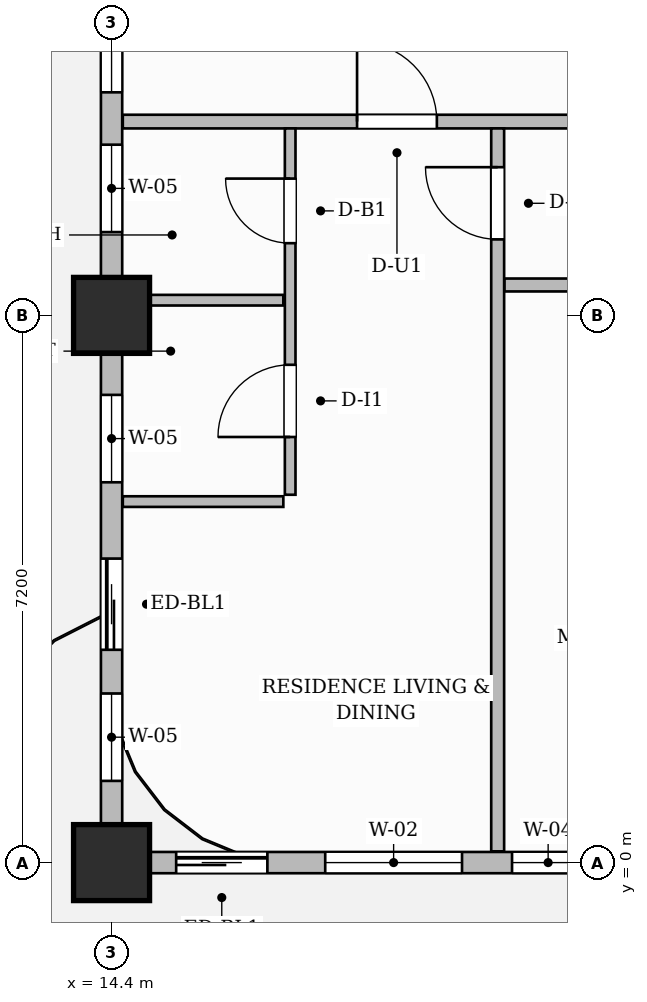
"""IFC4 building model, lengths in metres.
Left out: names, types, materials, properties, quantities, classifications, styles, units other than length and angle.
Written with IfcOpenShell. Run it as: python <this file> out.ifc"""

import sys

from ifc_helpers import new_model, si_unit, direction, frame, frame_2d, origin, origin_2d, place, context, subcontext, project, spatial, rectangle, extrude, source, transform, mapped, element, fill, save


model = new_model("IFC4")
c1 = context("Model", 3, precision=1e-05, world=origin(), true_north=direction((0.0, 1.0)))
c2 = subcontext(c1, "Body", "Model", "MODEL_VIEW")
j1 = project(units=[si_unit("LENGTHUNIT", "METRE"), si_unit("PLANEANGLEUNIT", "RADIAN")], contexts=[c1])
p1 = place(None, origin())
s1 = spatial("IfcSite", under=j1, at=p1, CompositionType="ELEMENT")
p2 = place(p1, origin())
s2 = spatial("IfcBuilding", under=s1, at=p2, CompositionType="ELEMENT")
p3 = place(p2, frame((0.0, 0.0, 173.4)))
s3 = spatial("IfcBuildingStorey", under=s2, at=p3, CompositionType="ELEMENT", Elevation=173.4)
m1 = source(origin(), c2, "Body", "SweptSolid", [
    extrude(rectangle(XDim=1.0, YDim=1.0, at=origin_2d()), origin(), (0.0, 0.0, 1.0), 3.85),
])
for number, where, z_axis, x_axis in (
    (1, (14.4, 0.0, 0.0), (0.0, 0.0, 1.0), (1.0, 0.0, 0.0)),
    (2, (14.4, 7.2, 0.0), (0.0, 0.0, 1.0), (1.0, 0.0, 0.0)),
):
    element("IfcColumn", number, at=place(p3, frame(where, z_axis=z_axis, x_axis=x_axis)), inside=s3, PredefinedType="COLUMN", context=c2, shape_type="MappedRepresentation", body=[
        mapped(m1, transform((0.0, 0.0, 0.0), scale=1.0)),
    ])
p4 = place(p3, frame((14.548, 9.75, 0.0), z_axis=(0.0, 0.0, 1.0), x_axis=(1.0, 0.0, 0.0)))
e3 = element("IfcWall", 3, at=p4, inside=s3, PredefinedType="PARTITIONING", context=c2, shape_type="SweptSolid", body=[
    extrude(rectangle(XDim=15.562, YDim=0.18, at=frame_2d((7.781, 0.0))), origin(), (0.0, 0.0, 1.0), 3.6),
])
p5 = place(p4, frame((3.082, 0.0, 0.0)))
e4 = element("IfcOpeningElement", 4, at=p5, cuts=e3, PredefinedType="OPENING", context=c2, shape_type="SweptSolid", body=[
    extrude(rectangle(XDim=1.05, YDim=2.25, at=frame_2d((0.525, 1.125))), frame((0.0, 0.1, 0.0), z_axis=(0.0, -1.0, 0.0), x_axis=(1.0, 0.0, 0.0)), (0.0, 0.0, 1.0), 0.2),
])
p6 = place(p3, frame((16.75, 4.84, 0.0), z_axis=(0.0, 0.0, 1.0), x_axis=(0.0, 1.0, 0.0)))
e5 = element("IfcWall", 5, at=p6, inside=s3, PredefinedType="PARTITIONING", context=c2, shape_type="SweptSolid", body=[
    extrude(rectangle(XDim=4.82, YDim=0.14, at=frame_2d((2.41, 0.0))), origin(), (0.0, 0.0, 1.0), 3.6),
])
p7 = place(p6, frame((0.76, 0.0, 0.0)))
e6 = element("IfcOpeningElement", 6, at=p7, cuts=e5, PredefinedType="OPENING", context=c2, shape_type="SweptSolid", body=[
    extrude(rectangle(XDim=0.95, YDim=2.15, at=frame_2d((0.475, 1.075))), frame((0.0, 0.08, 0.0), z_axis=(0.0, -1.0, 0.0), x_axis=(1.0, 0.0, 0.0)), (0.0, 0.0, 1.0), 0.16),
])
p8 = place(p6, frame((3.31, 0.0, 0.0)))
e7 = element("IfcOpeningElement", 7, at=p8, cuts=e5, PredefinedType="OPENING", context=c2, shape_type="SweptSolid", body=[
    extrude(rectangle(XDim=0.85, YDim=2.1, at=frame_2d((0.425, 1.05))), frame((0.0, 0.08, 0.0), z_axis=(0.0, -1.0, 0.0), x_axis=(1.0, 0.0, 0.0)), (0.0, 0.0, 1.0), 0.16),
])
p9 = place(p3, frame((14.59, 7.4, 0.0), z_axis=(0.0, 0.0, 1.0), x_axis=(1.0, 0.0, 0.0)))
e8 = element("IfcWall", 8, at=p9, inside=s3, PredefinedType="PARTITIONING", context=c2, shape_type="SweptSolid", body=[
    extrude(rectangle(XDim=2.07, YDim=0.14, at=frame_2d((1.035, 0.0))), origin(), (0.0, 0.0, 1.0), 3.085),
])
p10 = place(p3, frame((14.548, 4.75, 0.0), z_axis=(0.0, 0.0, 1.0), x_axis=(1.0, 0.0, 0.0)))
e9 = element("IfcWall", 9, at=p10, inside=s3, PredefinedType="PARTITIONING", context=c2, shape_type="SweptSolid", body=[
    extrude(rectangle(XDim=2.112, YDim=0.14, at=frame_2d((1.056, 0.0))), origin(), (0.0, 0.0, 1.0), 3.6),
])
p11 = place(p3, frame((19.48, 0.148, 0.0), z_axis=(0.0, 0.0, 1.0), x_axis=(0.0, 1.0, 0.0)))
e10 = element("IfcWall", 10, at=p11, inside=s3, PredefinedType="PARTITIONING", context=c2, shape_type="SweptSolid", body=[
    extrude(rectangle(XDim=9.512, YDim=0.17, at=frame_2d((4.756, 0.0))), origin(), (0.0, 0.0, 1.0), 3.6),
])
p12 = place(p11, frame((8.052, 0.0, 0.0)))
e11 = element("IfcOpeningElement", 11, at=p12, cuts=e10, PredefinedType="OPENING", context=c2, shape_type="SweptSolid", body=[
    extrude(rectangle(XDim=0.95, YDim=2.15, at=frame_2d((0.475, 1.075))), frame((0.0, 0.095, 0.0), z_axis=(0.0, -1.0, 0.0), x_axis=(1.0, 0.0, 0.0)), (0.0, 0.0, 1.0), 0.19),
])
p13 = place(p3, frame((19.57, 7.6, 0.0), z_axis=(0.0, 0.0, 1.0), x_axis=(1.0, 0.0, 0.0)))
e12 = element("IfcWall", 12, at=p13, inside=s3, PredefinedType="PARTITIONING", context=c2, shape_type="SweptSolid", body=[
    extrude(rectangle(XDim=10.54, YDim=0.17, at=frame_2d((5.27, 0.0))), origin(), (0.0, 0.0, 1.0), 3.6),
])
p14 = place(p13, frame((2.784, 0.0, 0.0)))
e13 = element("IfcOpeningElement", 13, at=p14, cuts=e12, PredefinedType="OPENING", context=c2, shape_type="SweptSolid", body=[
    extrude(rectangle(XDim=0.95, YDim=2.15, at=frame_2d((0.475, 1.075))), frame((0.0, 0.095, 0.0), z_axis=(0.0, -1.0, 0.0), x_axis=(1.0, 0.0, 0.0)), (0.0, 0.0, 1.0), 0.19),
])
p15 = place(p13, frame((4.865, 0.0, 0.0)))
e14 = element("IfcOpeningElement", 14, at=p15, cuts=e12, PredefinedType="OPENING", context=c2, shape_type="SweptSolid", body=[
    extrude(rectangle(XDim=0.95, YDim=2.15, at=frame_2d((0.475, 1.075))), frame((0.0, 0.095, 0.0), z_axis=(0.0, -1.0, 0.0), x_axis=(1.0, 0.0, 0.0)), (0.0, 0.0, 1.0), 0.19),
])
p16 = place(p13, frame((7.055, 0.0, 0.0)))
e15 = element("IfcOpeningElement", 15, at=p16, cuts=e12, PredefinedType="OPENING", context=c2, shape_type="SweptSolid", body=[
    extrude(rectangle(XDim=0.95, YDim=2.15, at=frame_2d((0.475, 1.075))), frame((0.0, 0.095, 0.0), z_axis=(0.0, -1.0, 0.0), x_axis=(1.0, 0.0, 0.0)), (0.0, 0.0, 1.0), 0.19),
])
p17 = place(p3, frame((14.4, 0.0, 0.0), z_axis=(0.0, 0.0, 1.0), x_axis=(1.0, 0.0, 0.0)))
e16 = element("IfcWall", 16, at=p17, inside=s3, PredefinedType="SOLIDWALL", context=c2, shape_type="SweptSolid", body=[
    extrude(rectangle(XDim=35.4, YDim=0.28, at=frame_2d((17.7, 0.0))), origin(), (0.0, 0.0, 1.0), 3.085),
])
p18 = place(p17, frame((0.85, 0.0, 0.0)))
e17 = element("IfcOpeningElement", 17, at=p18, cuts=e16, PredefinedType="OPENING", context=c2, shape_type="SweptSolid", body=[
    extrude(rectangle(XDim=1.2, YDim=2.2, at=frame_2d((0.6, 1.1))), frame((0.0, 0.15, 0.0), z_axis=(0.0, -1.0, 0.0), x_axis=(1.0, 0.0, 0.0)), (0.0, 0.0, 1.0), 0.3),
])
p19 = place(p17, frame((2.811, 0.0, 0.8)))
e18 = element("IfcOpeningElement", 18, at=p19, cuts=e16, PredefinedType="OPENING", context=c2, shape_type="SweptSolid", body=[
    extrude(rectangle(XDim=1.8, YDim=1.85, at=frame_2d((0.9, 0.925))), frame((0.0, 0.15, 0.0), z_axis=(0.0, -1.0, 0.0), x_axis=(1.0, 0.0, 0.0)), (0.0, 0.0, 1.0), 0.3),
])
p20 = place(p17, frame((5.269, 0.0, 0.8)))
e19 = element("IfcOpeningElement", 19, at=p20, cuts=e16, PredefinedType="OPENING", context=c2, shape_type="SweptSolid", body=[
    extrude(rectangle(XDim=0.95, YDim=1.75, at=frame_2d((0.475, 0.875))), frame((0.0, 0.15, 0.0), z_axis=(0.0, -1.0, 0.0), x_axis=(1.0, 0.0, 0.0)), (0.0, 0.0, 1.0), 0.3),
])
p21 = place(p17, frame((8.181, 0.0, 0.8)))
e20 = element("IfcOpeningElement", 20, at=p21, cuts=e16, PredefinedType="OPENING", context=c2, shape_type="SweptSolid", body=[
    extrude(rectangle(XDim=0.95, YDim=1.75, at=frame_2d((0.475, 0.875))), frame((0.0, 0.15, 0.0), z_axis=(0.0, -1.0, 0.0), x_axis=(1.0, 0.0, 0.0)), (0.0, 0.0, 1.0), 0.3),
])
p22 = place(p17, frame((9.81, 0.0, 0.8)))
e21 = element("IfcOpeningElement", 21, at=p22, cuts=e16, PredefinedType="OPENING", context=c2, shape_type="SweptSolid", body=[
    extrude(rectangle(XDim=1.4, YDim=1.85, at=frame_2d((0.7, 0.925))), frame((0.0, 0.15, 0.0), z_axis=(0.0, -1.0, 0.0), x_axis=(1.0, 0.0, 0.0)), (0.0, 0.0, 1.0), 0.3),
])
p23 = place(p17, frame((12.079, 0.0, 0.8)))
e22 = element("IfcOpeningElement", 22, at=p23, cuts=e16, PredefinedType="OPENING", context=c2, shape_type="SweptSolid", body=[
    extrude(rectangle(XDim=1.15, YDim=1.8, at=frame_2d((0.575, 0.9))), frame((0.0, 0.15, 0.0), z_axis=(0.0, -1.0, 0.0), x_axis=(1.0, 0.0, 0.0)), (0.0, 0.0, 1.0), 0.3),
])
p24 = place(p17, frame((16.804, 0.0, 0.8)))
e23 = element("IfcOpeningElement", 23, at=p24, cuts=e16, PredefinedType="OPENING", context=c2, shape_type="SweptSolid", body=[
    extrude(rectangle(XDim=1.8, YDim=1.85, at=frame_2d((0.9, 0.925))), frame((0.0, 0.15, 0.0), z_axis=(0.0, -1.0, 0.0), x_axis=(1.0, 0.0, 0.0)), (0.0, 0.0, 1.0), 0.3),
])
p25 = place(p17, frame((21.725, 0.0, 0.8)))
e24 = element("IfcOpeningElement", 24, at=p25, cuts=e16, PredefinedType="OPENING", context=c2, shape_type="SweptSolid", body=[
    extrude(rectangle(XDim=1.8, YDim=1.85, at=frame_2d((0.9, 0.925))), frame((0.0, 0.15, 0.0), z_axis=(0.0, -1.0, 0.0), x_axis=(1.0, 0.0, 0.0)), (0.0, 0.0, 1.0), 0.3),
])
p26 = place(p17, frame((24.475, 0.0, 0.8)))
e25 = element("IfcOpeningElement", 25, at=p26, cuts=e16, PredefinedType="OPENING", context=c2, shape_type="SweptSolid", body=[
    extrude(rectangle(XDim=1.8, YDim=1.85, at=frame_2d((0.9, 0.925))), frame((0.0, 0.15, 0.0), z_axis=(0.0, -1.0, 0.0), x_axis=(1.0, 0.0, 0.0)), (0.0, 0.0, 1.0), 0.3),
])
p27 = place(p17, frame((29.075, 0.0, 0.8)))
e26 = element("IfcOpeningElement", 26, at=p27, cuts=e16, PredefinedType="OPENING", context=c2, shape_type="SweptSolid", body=[
    extrude(rectangle(XDim=1.8, YDim=1.85, at=frame_2d((0.9, 0.925))), frame((0.0, 0.15, 0.0), z_axis=(0.0, -1.0, 0.0), x_axis=(1.0, 0.0, 0.0)), (0.0, 0.0, 1.0), 0.3),
])
p28 = place(p17, frame((32.125, 0.0, 0.8)))
e27 = element("IfcOpeningElement", 27, at=p28, cuts=e16, PredefinedType="OPENING", context=c2, shape_type="SweptSolid", body=[
    extrude(rectangle(XDim=1.8, YDim=1.85, at=frame_2d((0.9, 0.925))), frame((0.0, 0.15, 0.0), z_axis=(0.0, -1.0, 0.0), x_axis=(1.0, 0.0, 0.0)), (0.0, 0.0, 1.0), 0.3),
])
p29 = place(p3, frame((14.4, 0.05, 0.0), z_axis=(0.0, 0.0, 1.0), x_axis=(0.0, 1.0, 0.0)))
e28 = element("IfcWall", 28, at=p29, inside=s3, PredefinedType="SOLIDWALL", context=c2, shape_type="SweptSolid", body=[
    extrude(rectangle(XDim=20.6, YDim=0.28, at=frame_2d((10.3, 0.0))), origin(), (0.0, 0.0, 1.0), 3.085),
])
p30 = place(p29, frame((2.75, 0.0, 0.0)))
e29 = element("IfcOpeningElement", 29, at=p30, cuts=e28, PredefinedType="OPENING", context=c2, shape_type="SweptSolid", body=[
    extrude(rectangle(XDim=1.2, YDim=2.2, at=frame_2d((0.6, 1.1))), frame((0.0, 0.15, 0.0), z_axis=(0.0, -1.0, 0.0), x_axis=(1.0, 0.0, 0.0)), (0.0, 0.0, 1.0), 0.3),
])
p31 = place(p29, frame((1.025, 0.0, 0.8)))
e30 = element("IfcOpeningElement", 30, at=p31, cuts=e28, PredefinedType="OPENING", context=c2, shape_type="SweptSolid", body=[
    extrude(rectangle(XDim=1.15, YDim=1.8, at=frame_2d((0.575, 0.9))), frame((0.0, 0.15, 0.0), z_axis=(0.0, -1.0, 0.0), x_axis=(1.0, 0.0, 0.0)), (0.0, 0.0, 1.0), 0.3),
])
p32 = place(p29, frame((4.954, 0.0, 0.8)))
e31 = element("IfcOpeningElement", 31, at=p32, cuts=e28, PredefinedType="OPENING", context=c2, shape_type="SweptSolid", body=[
    extrude(rectangle(XDim=1.15, YDim=1.8, at=frame_2d((0.575, 0.9))), frame((0.0, 0.15, 0.0), z_axis=(0.0, -1.0, 0.0), x_axis=(1.0, 0.0, 0.0)), (0.0, 0.0, 1.0), 0.3),
])
p33 = place(p29, frame((8.246, 0.0, 0.8)))
e32 = element("IfcOpeningElement", 32, at=p33, cuts=e28, PredefinedType="OPENING", context=c2, shape_type="SweptSolid", body=[
    extrude(rectangle(XDim=1.15, YDim=1.8, at=frame_2d((0.575, 0.9))), frame((0.0, 0.15, 0.0), z_axis=(0.0, -1.0, 0.0), x_axis=(1.0, 0.0, 0.0)), (0.0, 0.0, 1.0), 0.3),
])
p34 = place(p29, frame((10.085, 0.0, 0.8)))
e33 = element("IfcOpeningElement", 33, at=p34, cuts=e28, PredefinedType="OPENING", context=c2, shape_type="SweptSolid", body=[
    extrude(rectangle(XDim=1.15, YDim=1.8, at=frame_2d((0.575, 0.9))), frame((0.0, 0.15, 0.0), z_axis=(0.0, -1.0, 0.0), x_axis=(1.0, 0.0, 0.0)), (0.0, 0.0, 1.0), 0.3),
])
p35 = place(p29, frame((12.014, 0.0, 0.8)))
e34 = element("IfcOpeningElement", 34, at=p35, cuts=e28, PredefinedType="OPENING", context=c2, shape_type="SweptSolid", body=[
    extrude(rectangle(XDim=1.15, YDim=1.8, at=frame_2d((0.575, 0.9))), frame((0.0, 0.15, 0.0), z_axis=(0.0, -1.0, 0.0), x_axis=(1.0, 0.0, 0.0)), (0.0, 0.0, 1.0), 0.3),
])
p36 = place(p29, frame((16.79, 0.0, 0.8)))
e35 = element("IfcOpeningElement", 35, at=p36, cuts=e28, PredefinedType="OPENING", context=c2, shape_type="SweptSolid", body=[
    extrude(rectangle(XDim=1.8, YDim=1.85, at=frame_2d((0.9, 0.925))), frame((0.0, 0.15, 0.0), z_axis=(0.0, -1.0, 0.0), x_axis=(1.0, 0.0, 0.0)), (0.0, 0.0, 1.0), 0.3),
])
m2 = source(origin(), c2, "Body", "SweptSolid", [
    extrude(rectangle(XDim=0.95, YDim=2.15, at=frame_2d((0.475, 1.075))), frame((0.0, 0.025, 0.0), z_axis=(0.0, -1.0, 0.0), x_axis=(1.0, 0.0, 0.0)), (0.0, 0.0, 1.0), 0.05),
])
p37 = place(p7, origin())
e36 = element("IfcDoor", 36, at=p37, inside=s3, OperationType="SINGLE_SWING_LEFT", PredefinedType="DOOR", context=c2, shape_type="MappedRepresentation", body=[
    mapped(m2, transform((0.0, 0.0, 0.0), scale=1.0)),
])
fill(e6, e36)
m3 = source(origin(), c2, "Body", "SweptSolid", [
    extrude(rectangle(XDim=0.85, YDim=2.1, at=frame_2d((0.425, 1.05))), frame((0.0, 0.025, 0.0), z_axis=(0.0, -1.0, 0.0), x_axis=(1.0, 0.0, 0.0)), (0.0, 0.0, 1.0), 0.05),
])
p38 = place(p8, origin())
e37 = element("IfcDoor", 37, at=p38, inside=s3, OperationType="SINGLE_SWING_RIGHT", PredefinedType="DOOR", context=c2, shape_type="MappedRepresentation", body=[
    mapped(m3, transform((0.0, 0.0, 0.0), scale=1.0)),
])
fill(e7, e37)
m4 = source(origin(), c2, "Body", "SweptSolid", [
    extrude(rectangle(XDim=1.05, YDim=2.25, at=frame_2d((0.525, 1.125))), frame((0.0, 0.025, 0.0), z_axis=(0.0, -1.0, 0.0), x_axis=(1.0, 0.0, 0.0)), (0.0, 0.0, 1.0), 0.05),
])
p39 = place(p5, origin())
e38 = element("IfcDoor", 38, at=p39, inside=s3, OperationType="SINGLE_SWING_LEFT", PredefinedType="DOOR", context=c2, shape_type="MappedRepresentation", body=[
    mapped(m4, transform((0.0, 0.0, 0.0), scale=1.0)),
])
fill(e4, e38)
p40 = place(p12, origin())
e39 = element("IfcDoor", 39, at=p40, inside=s3, OperationType="SINGLE_SWING_RIGHT", PredefinedType="DOOR", context=c2, shape_type="MappedRepresentation", body=[
    mapped(m2, transform((0.0, 0.0, 0.0), scale=1.0)),
])
fill(e11, e39)
m5 = source(origin(), c2, "Body", "SweptSolid", [
    extrude(rectangle(XDim=1.2, YDim=2.2, at=frame_2d((0.6, 1.1))), frame((0.0, 0.025, 0.0), z_axis=(0.0, -1.0, 0.0), x_axis=(1.0, 0.0, 0.0)), (0.0, 0.0, 1.0), 0.05),
])
p41 = place(p18, origin())
e40 = element("IfcDoor", 40, at=p41, inside=s3, OperationType="SLIDING_TO_LEFT", PredefinedType="DOOR", context=c2, shape_type="MappedRepresentation", body=[
    mapped(m5, transform((0.0, 0.0, 0.0), scale=1.0)),
])
fill(e17, e40)
p42 = place(p30, origin())
e41 = element("IfcDoor", 41, at=p42, inside=s3, OperationType="SLIDING_TO_LEFT", PredefinedType="DOOR", context=c2, shape_type="MappedRepresentation", body=[
    mapped(m5, transform((0.0, 0.0, 0.0), scale=1.0)),
])
fill(e29, e41)
m6 = source(origin(), c2, "Body", "SweptSolid", [
    extrude(rectangle(XDim=1.8, YDim=1.85, at=frame_2d((0.9, 0.925))), frame((0.0, 0.03, 0.0), z_axis=(0.0, -1.0, 0.0), x_axis=(1.0, 0.0, 0.0)), (0.0, 0.0, 1.0), 0.06),
])
p43 = place(p19, origin())
e42 = element("IfcWindow", 42, at=p43, inside=s3, PartitioningType="DOUBLE_PANEL_VERTICAL", PredefinedType="WINDOW", context=c2, shape_type="MappedRepresentation", body=[
    mapped(m6, transform((0.0, 0.0, 0.0), scale=1.0)),
])
fill(e18, e42)
m7 = source(origin(), c2, "Body", "SweptSolid", [
    extrude(rectangle(XDim=0.95, YDim=1.75, at=frame_2d((0.475, 0.875))), frame((0.0, 0.03, 0.0), z_axis=(0.0, -1.0, 0.0), x_axis=(1.0, 0.0, 0.0)), (0.0, 0.0, 1.0), 0.06),
])
p44 = place(p20, origin())
e43 = element("IfcWindow", 43, at=p44, inside=s3, PartitioningType="SINGLE_PANEL", PredefinedType="WINDOW", context=c2, shape_type="MappedRepresentation", body=[
    mapped(m7, transform((0.0, 0.0, 0.0), scale=1.0)),
])
fill(e19, e43)
m8 = source(origin(), c2, "Body", "SweptSolid", [
    extrude(rectangle(XDim=1.15, YDim=1.8, at=frame_2d((0.575, 0.9))), frame((0.0, 0.03, 0.0), z_axis=(0.0, -1.0, 0.0), x_axis=(1.0, 0.0, 0.0)), (0.0, 0.0, 1.0), 0.06),
])
p45 = place(p31, origin())
e44 = element("IfcWindow", 44, at=p45, inside=s3, PartitioningType="SINGLE_PANEL", PredefinedType="WINDOW", context=c2, shape_type="MappedRepresentation", body=[
    mapped(m8, transform((0.0, 0.0, 0.0), scale=1.0)),
])
fill(e30, e44)
p46 = place(p32, origin())
e45 = element("IfcWindow", 45, at=p46, inside=s3, PartitioningType="SINGLE_PANEL", PredefinedType="WINDOW", context=c2, shape_type="MappedRepresentation", body=[
    mapped(m8, transform((0.0, 0.0, 0.0), scale=1.0)),
])
fill(e31, e45)
p47 = place(p33, origin())
e46 = element("IfcWindow", 46, at=p47, inside=s3, PartitioningType="SINGLE_PANEL", PredefinedType="WINDOW", context=c2, shape_type="MappedRepresentation", body=[
    mapped(m8, transform((0.0, 0.0, 0.0), scale=1.0)),
])
fill(e32, e46)
p48 = place(p34, origin())
e47 = element("IfcWindow", 47, at=p48, inside=s3, PartitioningType="SINGLE_PANEL", PredefinedType="WINDOW", context=c2, shape_type="MappedRepresentation", body=[
    mapped(m8, transform((0.0, 0.0, 0.0), scale=1.0)),
])
fill(e33, e47)
save(model, sys.argv[1])
